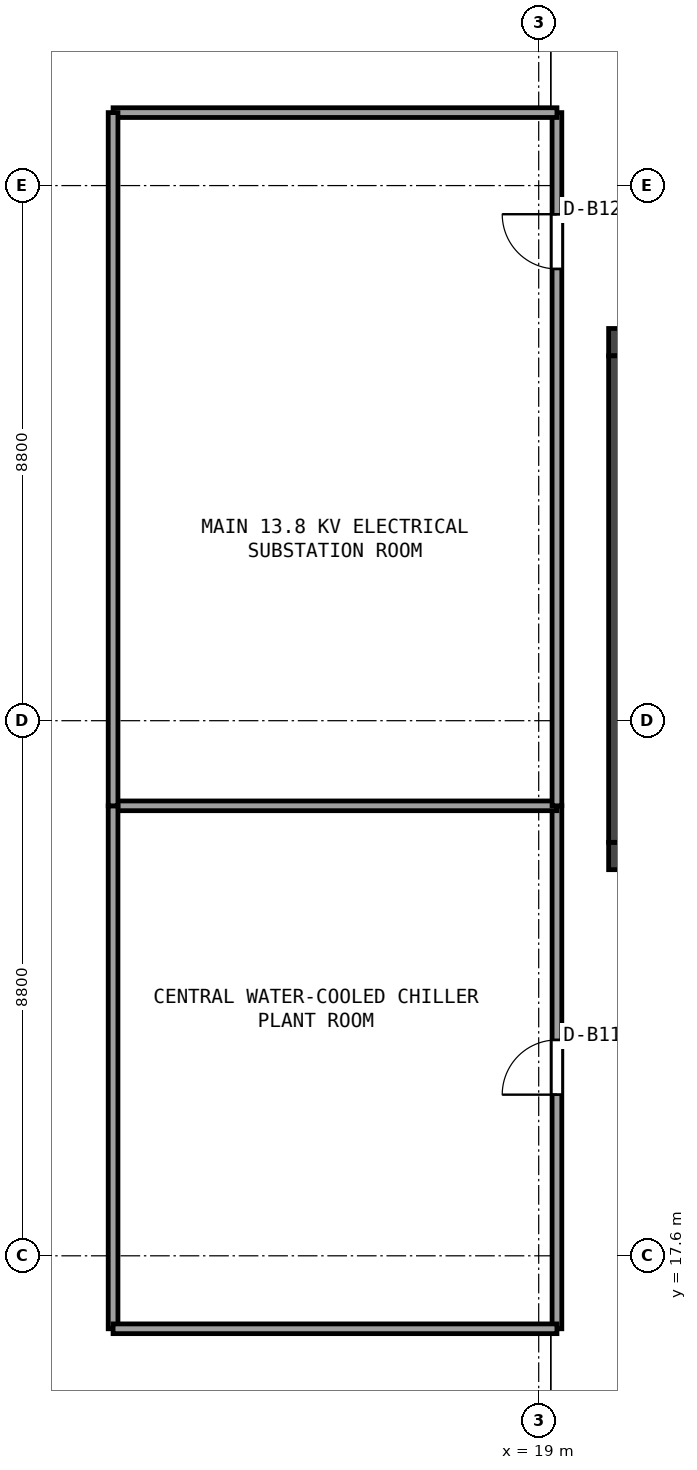
"""IFC4 building model, lengths in metres.
Left out: names, types, materials, properties, quantities, classifications, styles, units other than length and angle.
Written with IfcOpenShell. Run it as: python <this file> out.ifc"""

import sys

from ifc_helpers import new_model, si_unit, direction, frame, frame_2d, origin, place, context, subcontext, project, spatial, rectangle, extrude, element, fill, save


model = new_model("IFC4")
c1 = context("Model", 3, precision=1e-05, world=origin(), true_north=direction((0.0, 1.0)))
c2 = subcontext(c1, "Body", "Model", "MODEL_VIEW")
j1 = project(units=[si_unit("LENGTHUNIT", "METRE"), si_unit("PLANEANGLEUNIT", "RADIAN")], contexts=[c1])
p1 = place(None, origin())
s1 = spatial("IfcSite", under=j1, at=p1, CompositionType="ELEMENT")
p2 = place(p1, origin())
s2 = spatial("IfcBuilding", under=s1, at=p2, CompositionType="ELEMENT")
p3 = place(p2, frame((0.0, 0.0, -5.4)))
s3 = spatial("IfcBuildingStorey", under=s2, at=p3, CompositionType="ELEMENT", Elevation=-5.4)
for number, where, z_axis, x_axis in (
    (1, (20.15, 24.175, 0.0), (0.0, 0.0, 1.0), (1.0, 0.0, 0.0)),
    (2, (20.15, 32.625, 0.0), (0.0, 0.0, 1.0), (1.0, 0.0, 0.0)),
):
    element("IfcWall", number, at=place(p3, frame(where, z_axis=z_axis, x_axis=x_axis)), inside=s3, PredefinedType="SHEAR", context=c2, shape_type="SweptSolid", body=[
        extrude(rectangle(XDim=4.6, YDim=0.45, at=frame_2d((2.3, 0.0))), origin(), (0.0, 0.0, 1.0), 5.05),
    ])
p4 = place(p3, frame((20.375, 24.4, 0.0), z_axis=(0.0, 0.0, 1.0), x_axis=(0.0, 1.0, 0.0)))
e3 = element("IfcWall", 3, at=p4, inside=s3, PredefinedType="SHEAR", context=c2, shape_type="SweptSolid", body=[
    extrude(rectangle(XDim=8.0, YDim=0.45, at=frame_2d((4.0, 0.0))), origin(), (0.0, 0.0, 1.0), 5.05),
])
p5 = place(p3, frame((19.3, 16.4, 0.0), z_axis=(0.0, 0.0, 1.0), x_axis=(0.0, 1.0, 0.0)))
e4 = element("IfcWall", 4, at=p5, inside=s3, PredefinedType="PARTITIONING", context=c2, shape_type="SweptSolid", body=[
    extrude(rectangle(XDim=8.6, YDim=0.16, at=frame_2d((4.3, 0.0))), origin(), (0.0, 0.0, 1.0), 4.135),
])
p6 = place(p5, frame((3.85, 0.0, 0.0)))
e5 = element("IfcOpeningElement", 5, at=p6, cuts=e4, PredefinedType="OPENING", context=c2, shape_type="SweptSolid", body=[
    extrude(rectangle(XDim=0.9, YDim=2.0, at=frame_2d((0.45, 1.0))), frame((0.0, 0.09, 0.0), z_axis=(0.0, -1.0, 0.0), x_axis=(1.0, 0.0, 0.0)), (0.0, 0.0, 1.0), 0.18),
])
p7 = place(p3, frame((19.3, 25.0, 0.0), z_axis=(0.0, 0.0, 1.0), x_axis=(-1.0, 0.0, 0.0)))
e6 = element("IfcWall", 6, at=p7, inside=s3, PredefinedType="PARTITIONING", context=c2, shape_type="SweptSolid", body=[
    extrude(rectangle(XDim=7.3, YDim=0.16, at=frame_2d((3.65, 0.0))), origin(), (0.0, 0.0, 1.0), 5.05),
])
p8 = place(p3, frame((12.0, 25.0, 0.0), z_axis=(0.0, 0.0, 1.0), x_axis=(0.0, -1.0, 0.0)))
e7 = element("IfcWall", 7, at=p8, inside=s3, PredefinedType="PARTITIONING", context=c2, shape_type="SweptSolid", body=[
    extrude(rectangle(XDim=8.6, YDim=0.16, at=frame_2d((4.3, 0.0))), origin(), (0.0, 0.0, 1.0), 4.135),
])
p9 = place(p3, frame((12.0, 16.4, 0.0), z_axis=(0.0, 0.0, 1.0), x_axis=(1.0, 0.0, 0.0)))
e8 = element("IfcWall", 8, at=p9, inside=s3, PredefinedType="PARTITIONING", context=c2, shape_type="SweptSolid", body=[
    extrude(rectangle(XDim=7.3, YDim=0.16, at=frame_2d((3.65, 0.0))), origin(), (0.0, 0.0, 1.0), 5.05),
])
p10 = place(p3, frame((19.3, 25.0, 0.0), z_axis=(0.0, 0.0, 1.0), x_axis=(0.0, 1.0, 0.0)))
e9 = element("IfcWall", 9, at=p10, inside=s3, PredefinedType="PARTITIONING", context=c2, shape_type="SweptSolid", body=[
    extrude(rectangle(XDim=11.4, YDim=0.16, at=frame_2d((5.7, 0.0))), origin(), (0.0, 0.0, 1.0), 4.135),
])
p11 = place(p10, frame((8.829, 0.0, 0.0)))
e10 = element("IfcOpeningElement", 10, at=p11, cuts=e9, PredefinedType="OPENING", context=c2, shape_type="SweptSolid", body=[
    extrude(rectangle(XDim=0.9, YDim=2.0, at=frame_2d((0.45, 1.0))), frame((0.0, 0.09, 0.0), z_axis=(0.0, -1.0, 0.0), x_axis=(1.0, 0.0, 0.0)), (0.0, 0.0, 1.0), 0.18),
])
p12 = place(p3, frame((19.3, 36.4, 0.0), z_axis=(0.0, 0.0, 1.0), x_axis=(-1.0, 0.0, 0.0)))
e11 = element("IfcWall", 11, at=p12, inside=s3, PredefinedType="PARTITIONING", context=c2, shape_type="SweptSolid", body=[
    extrude(rectangle(XDim=7.3, YDim=0.16, at=frame_2d((3.65, 0.0))), origin(), (0.0, 0.0, 1.0), 4.135),
])
p13 = place(p3, frame((12.0, 36.4, 0.0), z_axis=(0.0, 0.0, 1.0), x_axis=(0.0, -1.0, 0.0)))
e12 = element("IfcWall", 12, at=p13, inside=s3, PredefinedType="PARTITIONING", context=c2, shape_type="SweptSolid", body=[
    extrude(rectangle(XDim=11.4, YDim=0.16, at=frame_2d((5.7, 0.0))), origin(), (0.0, 0.0, 1.0), 4.627),
])
p14 = place(p6, origin())
e13 = element("IfcDoor", 13, at=p14, inside=s3, OperationType="SINGLE_SWING_LEFT", PredefinedType="DOOR", context=c2, shape_type="SweptSolid", body=[
    extrude(rectangle(XDim=0.9, YDim=2.0, at=frame_2d((0.45, 1.0))), frame((0.0, 0.025, 0.0), z_axis=(0.0, -1.0, 0.0), x_axis=(1.0, 0.0, 0.0)), (0.0, 0.0, 1.0), 0.05),
])
fill(e5, e13)
p15 = place(p11, origin())
e14 = element("IfcDoor", 14, at=p15, inside=s3, OperationType="SINGLE_SWING_RIGHT", PredefinedType="DOOR", context=c2, shape_type="SweptSolid", body=[
    extrude(rectangle(XDim=0.9, YDim=2.0, at=frame_2d((0.45, 1.0))), frame((0.0, 0.025, 0.0), z_axis=(0.0, -1.0, 0.0), x_axis=(1.0, 0.0, 0.0)), (0.0, 0.0, 1.0), 0.05),
])
fill(e10, e14)
save(model, sys.argv[1])
